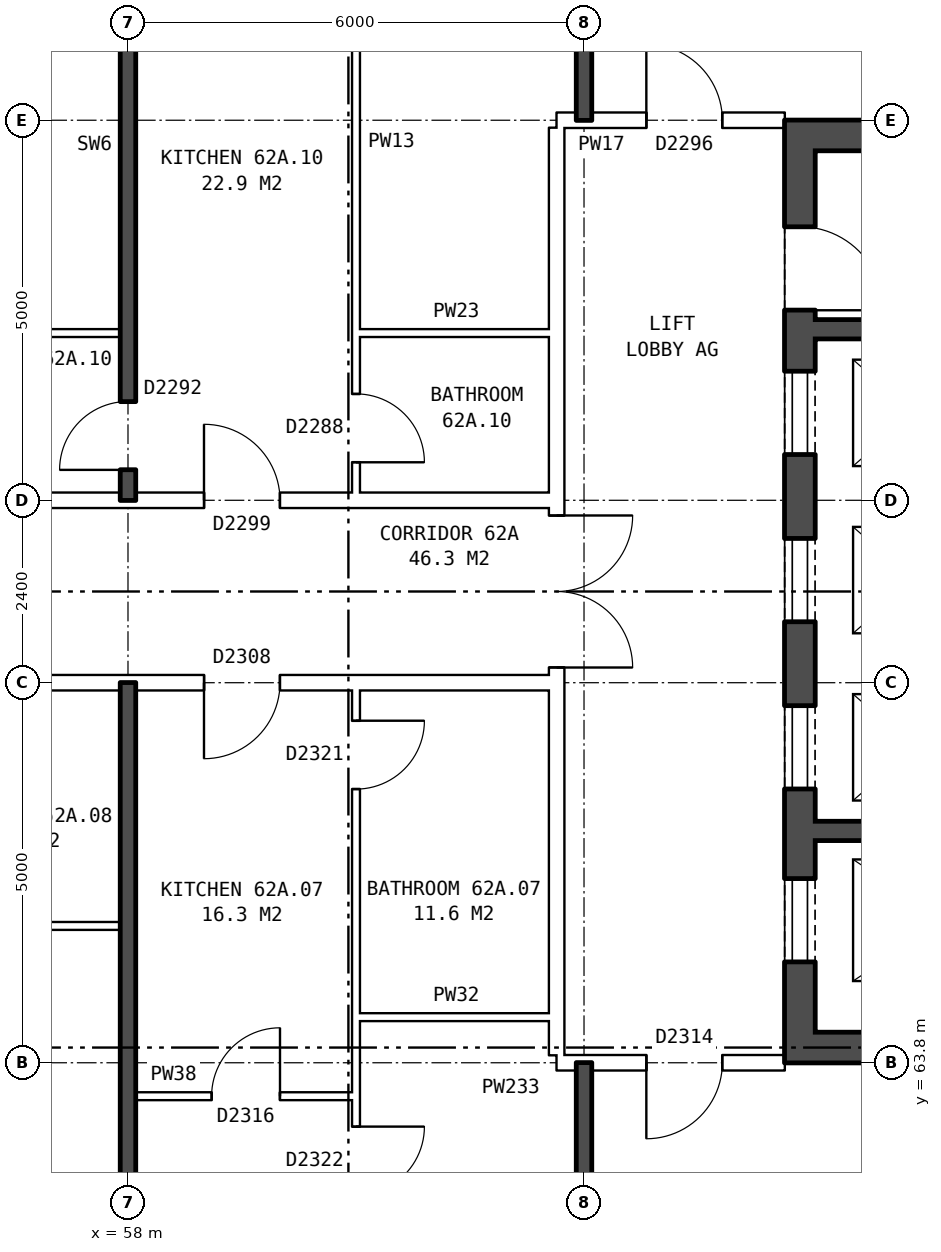
"""IFC4 building model, lengths in metres.
Left out: names, types, materials, properties, quantities, classifications, styles, units other than length and angle.
Written with IfcOpenShell. Run it as: python <this file> out.ifc"""

import sys

from ifc_helpers import new_model, si_unit, direction, frame, frame_2d, origin, place, context, subcontext, project, spatial, rectangle, extrude, element, fill, save


model = new_model("IFC4")
c1 = context("Model", 3, precision=1e-05, world=origin(), true_north=direction((0.0, 1.0)))
c2 = subcontext(c1, "Body", "Model", "MODEL_VIEW")
j1 = project(units=[si_unit("LENGTHUNIT", "METRE"), si_unit("PLANEANGLEUNIT", "RADIAN")], contexts=[c1])
p1 = place(None, origin())
s1 = spatial("IfcSite", under=j1, at=p1, CompositionType="ELEMENT")
p2 = place(p1, origin())
s2 = spatial("IfcBuilding", under=s1, at=p2, CompositionType="ELEMENT")
p3 = place(p2, frame((0.0, 0.0, 221.4)))
s3 = spatial("IfcBuildingStorey", under=s2, at=p3, CompositionType="ELEMENT", Elevation=221.4)
p4 = place(p3, frame((66.84, 63.8, 0.0), z_axis=(0.0, 0.0, 1.0), x_axis=(0.0, 1.0, 0.0)))
e1 = element("IfcWall", 1, at=p4, inside=s3, PredefinedType="SHEAR", context=c2, shape_type="SweptSolid", body=[
    extrude(rectangle(XDim=12.4, YDim=0.4, at=frame_2d((6.2, 0.0))), origin(), (0.0, 0.0, 1.0), 2.85),
])
p5 = place(p4, frame((1.325, 0.0, 0.0)))
e2 = element("IfcOpeningElement", 2, at=p5, cuts=e1, PredefinedType="OPENING", context=c2, shape_type="SweptSolid", body=[
    extrude(rectangle(XDim=1.1, YDim=2.1, at=frame_2d((0.55, 1.05))), frame((0.0, 0.21, 0.0), z_axis=(0.0, -1.0, 0.0), x_axis=(1.0, 0.0, 0.0)), (0.0, 0.0, 1.0), 0.42),
])
p6 = place(p4, frame((3.6, 0.0, 0.0)))
e3 = element("IfcOpeningElement", 3, at=p6, cuts=e1, PredefinedType="OPENING", context=c2, shape_type="SweptSolid", body=[
    extrude(rectangle(XDim=1.1, YDim=2.1, at=frame_2d((0.55, 1.05))), frame((0.0, 0.21, 0.0), z_axis=(0.0, -1.0, 0.0), x_axis=(1.0, 0.0, 0.0)), (0.0, 0.0, 1.0), 0.42),
])
p7 = place(p4, frame((5.8, 0.0, 0.0)))
e4 = element("IfcOpeningElement", 4, at=p7, cuts=e1, PredefinedType="OPENING", context=c2, shape_type="SweptSolid", body=[
    extrude(rectangle(XDim=1.1, YDim=2.1, at=frame_2d((0.55, 1.05))), frame((0.0, 0.21, 0.0), z_axis=(0.0, -1.0, 0.0), x_axis=(1.0, 0.0, 0.0)), (0.0, 0.0, 1.0), 0.42),
])
p8 = place(p4, frame((8.0, 0.0, 0.0)))
e5 = element("IfcOpeningElement", 5, at=p8, cuts=e1, PredefinedType="OPENING", context=c2, shape_type="SweptSolid", body=[
    extrude(rectangle(XDim=1.1, YDim=2.1, at=frame_2d((0.55, 1.05))), frame((0.0, 0.21, 0.0), z_axis=(0.0, -1.0, 0.0), x_axis=(1.0, 0.0, 0.0)), (0.0, 0.0, 1.0), 0.42),
])
p9 = place(p4, frame((9.9, 0.0, 0.0)))
e6 = element("IfcOpeningElement", 6, at=p9, cuts=e1, PredefinedType="OPENING", context=c2, shape_type="SweptSolid", body=[
    extrude(rectangle(XDim=1.1, YDim=2.1, at=frame_2d((0.55, 1.05))), frame((0.0, 0.21, 0.0), z_axis=(0.0, -1.0, 0.0), x_axis=(1.0, 0.0, 0.0)), (0.0, 0.0, 1.0), 0.42),
])
for number, where, z_axis, x_axis in (
    (7, (67.04, 64.0, 0.0), (0.0, 0.0, 1.0), (1.0, 0.0, 0.0)),
    (8, (67.04, 76.0, 0.0), (0.0, 0.0, 1.0), (1.0, 0.0, 0.0)),
):
    element("IfcWall", number, at=place(p3, frame(where, z_axis=z_axis, x_axis=x_axis)), inside=s3, PredefinedType="SHEAR", context=c2, shape_type="SweptSolid", body=[
        extrude(rectangle(XDim=8.2, YDim=0.4, at=frame_2d((4.1, 0.0))), origin(), (0.0, 0.0, 1.0), 2.85),
    ])
p10 = place(p3, frame((67.04, 66.85, 0.0), z_axis=(0.0, 0.0, 1.0), x_axis=(1.0, 0.0, 0.0)))
e9 = element("IfcWall", 9, at=p10, inside=s3, PredefinedType="SHEAR", context=c2, shape_type="SweptSolid", body=[
    extrude(rectangle(XDim=3.595, YDim=0.25, at=frame_2d((1.797, 0.0))), origin(), (0.0, 0.0, 1.0), 2.85),
])
p11 = place(p3, frame((67.04, 73.45, 0.0), z_axis=(0.0, 0.0, 1.0), x_axis=(1.0, 0.0, 0.0)))
e10 = element("IfcWall", 10, at=p11, inside=s3, PredefinedType="SHEAR", context=c2, shape_type="SweptSolid", body=[
    extrude(rectangle(XDim=2.525, YDim=0.25, at=frame_2d((1.262, 0.0))), origin(), (0.0, 0.0, 1.0), 2.85),
])
p12 = place(p3, frame((63.64, 63.9, 0.0), z_axis=(0.0, 0.0, 1.0), x_axis=(0.0, 1.0, 0.0)))
e11 = element("IfcWall", 11, at=p12, inside=s3, PredefinedType="PARTITIONING", context=c2, shape_type="SweptSolid", body=[
    extrude(rectangle(XDim=12.2, YDim=0.2, at=frame_2d((6.1, 0.0))), origin(), (0.0, 0.0, 1.0), 2.85),
])
p13 = place(p12, frame((5.1, 0.0, 0.0)))
e12 = element("IfcOpeningElement", 12, at=p13, cuts=e11, PredefinedType="OPENING", context=c2, shape_type="SweptSolid", body=[
    extrude(rectangle(XDim=2.0, YDim=2.1, at=frame_2d((1.0, 1.05))), frame((0.0, 0.11, 0.0), z_axis=(0.0, -1.0, 0.0), x_axis=(1.0, 0.0, 0.0)), (0.0, 0.0, 1.0), 0.22),
])
p14 = place(p3, frame((58.1, 63.36, 0.0), z_axis=(0.0, 0.0, 1.0), x_axis=(1.0, 0.0, 0.0)))
e13 = element("IfcWall", 13, at=p14, inside=s3, PredefinedType="PARTITIONING", context=c2, shape_type="SweptSolid", body=[
    extrude(rectangle(XDim=2.9, YDim=0.1, at=frame_2d((1.45, 0.0))), origin(), (0.0, 0.0, 1.0), 2.85),
])
p15 = place(p14, frame((1.0, 0.0, 0.0)))
e14 = element("IfcOpeningElement", 14, at=p15, cuts=e13, PredefinedType="OPENING", context=c2, shape_type="SweptSolid", body=[
    extrude(rectangle(XDim=0.9, YDim=2.1, at=frame_2d((0.45, 1.05))), frame((0.0, 0.06, 0.0), z_axis=(0.0, -1.0, 0.0), x_axis=(1.0, 0.0, 0.0)), (0.0, 0.0, 1.0), 0.12),
])
p16 = place(p3, frame((63.64, 63.8, 0.0), z_axis=(0.0, 0.0, 1.0), x_axis=(1.0, 0.0, 0.0)))
e15 = element("IfcWall", 15, at=p16, inside=s3, PredefinedType="PARTITIONING", context=c2, shape_type="SweptSolid", body=[
    extrude(rectangle(XDim=3.0, YDim=0.2, at=frame_2d((1.5, 0.0))), origin(), (0.0, 0.0, 1.0), 2.85),
])
p17 = place(p16, frame((1.18, 0.0, 0.0)))
e16 = element("IfcOpeningElement", 16, at=p17, cuts=e15, PredefinedType="OPENING", context=c2, shape_type="SweptSolid", body=[
    extrude(rectangle(XDim=1.0, YDim=2.1, at=frame_2d((0.5, 1.05))), frame((0.0, 0.11, 0.0), z_axis=(0.0, -1.0, 0.0), x_axis=(1.0, 0.0, 0.0)), (0.0, 0.0, 1.0), 0.22),
])
p18 = place(p3, frame((61.0, 64.4, 0.0), z_axis=(0.0, 0.0, 1.0), x_axis=(1.0, 0.0, 0.0)))
e17 = element("IfcWall", 17, at=p18, inside=s3, PredefinedType="PARTITIONING", context=c2, shape_type="SweptSolid", body=[
    extrude(rectangle(XDim=2.64, YDim=0.1, at=frame_2d((1.32, 0.0))), origin(), (0.0, 0.0, 1.0), 2.85),
])
p19 = place(p3, frame((55.0, 65.6, 0.0), z_axis=(0.0, 0.0, 1.0), x_axis=(1.0, 0.0, 0.0)))
e18 = element("IfcWall", 18, at=p19, inside=s3, PredefinedType="PARTITIONING", context=c2, shape_type="SweptSolid", body=[
    extrude(rectangle(XDim=2.9, YDim=0.1, at=frame_2d((1.45, 0.0))), origin(), (0.0, 0.0, 1.0), 2.85),
])
p20 = place(p3, frame((44.36, 68.8, 0.0), z_axis=(0.0, 0.0, 1.0), x_axis=(1.0, 0.0, 0.0)))
e19 = element("IfcWall", 19, at=p20, inside=s3, PredefinedType="PARTITIONING", context=c2, shape_type="SweptSolid", body=[
    extrude(rectangle(XDim=19.28, YDim=0.2, at=frame_2d((9.64, 0.0))), origin(), (0.0, 0.0, 1.0), 2.85),
])
p21 = place(p20, frame((14.64, 0.0, 0.0)))
e20 = element("IfcOpeningElement", 20, at=p21, cuts=e19, PredefinedType="OPENING", context=c2, shape_type="SweptSolid", body=[
    extrude(rectangle(XDim=1.0, YDim=2.1, at=frame_2d((0.5, 1.05))), frame((0.0, 0.11, 0.0), z_axis=(0.0, -1.0, 0.0), x_axis=(1.0, 0.0, 0.0)), (0.0, 0.0, 1.0), 0.22),
])
p22 = place(p20, frame((8.64, 0.0, 0.0)))
e21 = element("IfcOpeningElement", 21, at=p22, cuts=e19, PredefinedType="OPENING", context=c2, shape_type="SweptSolid", body=[
    extrude(rectangle(XDim=1.0, YDim=2.1, at=frame_2d((0.5, 1.05))), frame((0.0, 0.11, 0.0), z_axis=(0.0, -1.0, 0.0), x_axis=(1.0, 0.0, 0.0)), (0.0, 0.0, 1.0), 0.22),
])
p23 = place(p20, frame((5.64, 0.0, 0.0)))
e22 = element("IfcOpeningElement", 22, at=p23, cuts=e19, PredefinedType="OPENING", context=c2, shape_type="SweptSolid", body=[
    extrude(rectangle(XDim=1.0, YDim=2.1, at=frame_2d((0.5, 1.05))), frame((0.0, 0.11, 0.0), z_axis=(0.0, -1.0, 0.0), x_axis=(1.0, 0.0, 0.0)), (0.0, 0.0, 1.0), 0.22),
])
p24 = place(p3, frame((44.36, 71.2, 0.0), z_axis=(0.0, 0.0, 1.0), x_axis=(1.0, 0.0, 0.0)))
e23 = element("IfcWall", 23, at=p24, inside=s3, PredefinedType="PARTITIONING", context=c2, shape_type="SweptSolid", body=[
    extrude(rectangle(XDim=19.28, YDim=0.2, at=frame_2d((9.64, 0.0))), origin(), (0.0, 0.0, 1.0), 2.85),
])
p25 = place(p24, frame((14.64, 0.0, 0.0)))
e24 = element("IfcOpeningElement", 24, at=p25, cuts=e23, PredefinedType="OPENING", context=c2, shape_type="SweptSolid", body=[
    extrude(rectangle(XDim=1.0, YDim=2.1, at=frame_2d((0.5, 1.05))), frame((0.0, 0.11, 0.0), z_axis=(0.0, -1.0, 0.0), x_axis=(1.0, 0.0, 0.0)), (0.0, 0.0, 1.0), 0.22),
])
p26 = place(p24, frame((5.64, 0.0, 0.0)))
e25 = element("IfcOpeningElement", 25, at=p26, cuts=e23, PredefinedType="OPENING", context=c2, shape_type="SweptSolid", body=[
    extrude(rectangle(XDim=1.0, YDim=2.1, at=frame_2d((0.5, 1.05))), frame((0.0, 0.11, 0.0), z_axis=(0.0, -1.0, 0.0), x_axis=(1.0, 0.0, 0.0)), (0.0, 0.0, 1.0), 0.22),
])
p27 = place(p3, frame((55.1, 73.4, 0.0), z_axis=(0.0, 0.0, 1.0), x_axis=(1.0, 0.0, 0.0)))
e26 = element("IfcWall", 26, at=p27, inside=s3, PredefinedType="PARTITIONING", context=c2, shape_type="SweptSolid", body=[
    extrude(rectangle(XDim=2.8, YDim=0.1, at=frame_2d((1.4, 0.0))), origin(), (0.0, 0.0, 1.0), 2.85),
])
p28 = place(p3, frame((61.0, 73.4, 0.0), z_axis=(0.0, 0.0, 1.0), x_axis=(1.0, 0.0, 0.0)))
e27 = element("IfcWall", 27, at=p28, inside=s3, PredefinedType="PARTITIONING", context=c2, shape_type="SweptSolid", body=[
    extrude(rectangle(XDim=2.64, YDim=0.1, at=frame_2d((1.32, 0.0))), origin(), (0.0, 0.0, 1.0), 2.85),
])
p29 = place(p3, frame((63.64, 76.2, 0.0), z_axis=(0.0, 0.0, 1.0), x_axis=(1.0, 0.0, 0.0)))
e28 = element("IfcWall", 28, at=p29, inside=s3, PredefinedType="PARTITIONING", context=c2, shape_type="SweptSolid", body=[
    extrude(rectangle(XDim=3.0, YDim=0.2, at=frame_2d((1.5, 0.0))), origin(), (0.0, 0.0, 1.0), 2.85),
])
p30 = place(p29, frame((1.18, 0.0, 0.0)))
e29 = element("IfcOpeningElement", 29, at=p30, cuts=e28, PredefinedType="OPENING", context=c2, shape_type="SweptSolid", body=[
    extrude(rectangle(XDim=1.0, YDim=2.1, at=frame_2d((0.5, 1.05))), frame((0.0, 0.11, 0.0), z_axis=(0.0, -1.0, 0.0), x_axis=(1.0, 0.0, 0.0)), (0.0, 0.0, 1.0), 0.22),
])
p31 = place(p3, frame((58.0, 54.36, 0.0), z_axis=(0.0, 0.0, 1.0), x_axis=(0.0, 1.0, 0.0)))
e30 = element("IfcWall", 30, at=p31, inside=s3, PredefinedType="SOLIDWALL", context=c2, shape_type="SweptSolid", body=[
    extrude(rectangle(XDim=14.44, YDim=0.2, at=frame_2d((7.22, 0.0))), origin(), (0.0, 0.0, 1.0), 2.85),
])
p32 = place(p3, frame((58.0, 71.2, 0.0), z_axis=(0.0, 0.0, 1.0), x_axis=(0.0, 1.0, 0.0)))
e31 = element("IfcWall", 31, at=p32, inside=s3, PredefinedType="SOLIDWALL", context=c2, shape_type="SweptSolid", body=[
    extrude(rectangle(XDim=14.44, YDim=0.2, at=frame_2d((7.22, 0.0))), origin(), (0.0, 0.0, 1.0), 2.85),
])
p33 = place(p32, frame((8.04, 0.0, 0.0)))
e32 = element("IfcOpeningElement", 32, at=p33, cuts=e31, PredefinedType="OPENING", context=c2, shape_type="SweptSolid", body=[
    extrude(rectangle(XDim=0.9, YDim=2.1, at=frame_2d((0.45, 1.05))), frame((0.0, 0.11, 0.0), z_axis=(0.0, -1.0, 0.0), x_axis=(1.0, 0.0, 0.0)), (0.0, 0.0, 1.0), 0.22),
])
p34 = place(p32, frame((0.4, 0.0, 0.0)))
e33 = element("IfcOpeningElement", 33, at=p34, cuts=e31, PredefinedType="OPENING", context=c2, shape_type="SweptSolid", body=[
    extrude(rectangle(XDim=0.9, YDim=2.1, at=frame_2d((0.45, 1.05))), frame((0.0, 0.11, 0.0), z_axis=(0.0, -1.0, 0.0), x_axis=(1.0, 0.0, 0.0)), (0.0, 0.0, 1.0), 0.22),
])
p35 = place(p3, frame((61.0, 54.36, 0.0), z_axis=(0.0, 0.0, 1.0), x_axis=(0.0, 1.0, 0.0)))
e34 = element("IfcWall", 34, at=p35, inside=s3, PredefinedType="PARTITIONING", context=c2, shape_type="SweptSolid", body=[
    extrude(rectangle(XDim=14.34, YDim=0.1, at=frame_2d((7.17, 0.0))), origin(), (0.0, 0.0, 1.0), 2.85),
])
p36 = place(p35, frame((7.7, 0.0, 0.0)))
e35 = element("IfcOpeningElement", 35, at=p36, cuts=e34, PredefinedType="OPENING", context=c2, shape_type="SweptSolid", body=[
    extrude(rectangle(XDim=0.9, YDim=2.1, at=frame_2d((0.45, 1.05))), frame((0.0, 0.06, 0.0), z_axis=(0.0, -1.0, 0.0), x_axis=(1.0, 0.0, 0.0)), (0.0, 0.0, 1.0), 0.12),
])
p37 = place(p35, frame((13.04, 0.0, 0.0)))
e36 = element("IfcOpeningElement", 36, at=p37, cuts=e34, PredefinedType="OPENING", context=c2, shape_type="SweptSolid", body=[
    extrude(rectangle(XDim=0.9, YDim=2.1, at=frame_2d((0.45, 1.05))), frame((0.0, 0.06, 0.0), z_axis=(0.0, -1.0, 0.0), x_axis=(1.0, 0.0, 0.0)), (0.0, 0.0, 1.0), 0.12),
])
p38 = place(p3, frame((61.0, 71.3, 0.0), z_axis=(0.0, 0.0, 1.0), x_axis=(0.0, 1.0, 0.0)))
e37 = element("IfcWall", 37, at=p38, inside=s3, PredefinedType="PARTITIONING", context=c2, shape_type="SweptSolid", body=[
    extrude(rectangle(XDim=14.34, YDim=0.1, at=frame_2d((7.17, 0.0))), origin(), (0.0, 0.0, 1.0), 2.85),
])
p39 = place(p38, frame((7.94, 0.0, 0.0)))
e38 = element("IfcOpeningElement", 38, at=p39, cuts=e37, PredefinedType="OPENING", context=c2, shape_type="SweptSolid", body=[
    extrude(rectangle(XDim=0.9, YDim=2.1, at=frame_2d((0.45, 1.05))), frame((0.0, 0.06, 0.0), z_axis=(0.0, -1.0, 0.0), x_axis=(1.0, 0.0, 0.0)), (0.0, 0.0, 1.0), 0.12),
])
p40 = place(p38, frame((0.4, 0.0, 0.0)))
e39 = element("IfcOpeningElement", 39, at=p40, cuts=e37, PredefinedType="OPENING", context=c2, shape_type="SweptSolid", body=[
    extrude(rectangle(XDim=0.9, YDim=2.1, at=frame_2d((0.45, 1.05))), frame((0.0, 0.06, 0.0), z_axis=(0.0, -1.0, 0.0), x_axis=(1.0, 0.0, 0.0)), (0.0, 0.0, 1.0), 0.12),
])
for number, where, z_axis, x_axis in (
    (40, (64.0, 54.36, 0.0), (0.0, 0.0, 1.0), (0.0, 1.0, 0.0)),
    (41, (64.0, 76.2, 0.0), (0.0, 0.0, 1.0), (0.0, 1.0, 0.0)),
):
    element("IfcWall", number, at=place(p3, frame(where, z_axis=z_axis, x_axis=x_axis)), inside=s3, PredefinedType="SOLIDWALL", context=c2, shape_type="SweptSolid", body=[
        extrude(rectangle(XDim=9.44, YDim=0.2, at=frame_2d((4.72, 0.0))), origin(), (0.0, 0.0, 1.0), 2.85),
    ])
p41 = place(p5, origin())
e42 = element("IfcDoor", 42, at=p41, inside=s3, OperationType="DOUBLE_DOOR_SLIDING", PredefinedType="DOOR", context=c2, shape_type="SweptSolid", body=[
    extrude(rectangle(XDim=1.1, YDim=2.1, at=frame_2d((0.55, 1.05))), frame((0.0, -0.135, 0.0), z_axis=(0.0, -1.0, 0.0), x_axis=(1.0, 0.0, 0.0)), (0.0, 0.0, 1.0), 0.05),
])
fill(e2, e42)
p42 = place(p6, origin())
e43 = element("IfcDoor", 43, at=p42, inside=s3, OperationType="DOUBLE_DOOR_SLIDING", PredefinedType="DOOR", context=c2, shape_type="SweptSolid", body=[
    extrude(rectangle(XDim=1.1, YDim=2.1, at=frame_2d((0.55, 1.05))), frame((0.0, -0.135, 0.0), z_axis=(0.0, -1.0, 0.0), x_axis=(1.0, 0.0, 0.0)), (0.0, 0.0, 1.0), 0.05),
])
fill(e3, e43)
p43 = place(p7, origin())
e44 = element("IfcDoor", 44, at=p43, inside=s3, OperationType="DOUBLE_DOOR_SLIDING", PredefinedType="DOOR", context=c2, shape_type="SweptSolid", body=[
    extrude(rectangle(XDim=1.1, YDim=2.1, at=frame_2d((0.55, 1.05))), frame((0.0, -0.135, 0.0), z_axis=(0.0, -1.0, 0.0), x_axis=(1.0, 0.0, 0.0)), (0.0, 0.0, 1.0), 0.05),
])
fill(e4, e44)
p44 = place(p8, origin())
e45 = element("IfcDoor", 45, at=p44, inside=s3, OperationType="DOUBLE_DOOR_SLIDING", PredefinedType="DOOR", context=c2, shape_type="SweptSolid", body=[
    extrude(rectangle(XDim=1.1, YDim=2.1, at=frame_2d((0.55, 1.05))), frame((0.0, -0.135, 0.0), z_axis=(0.0, -1.0, 0.0), x_axis=(1.0, 0.0, 0.0)), (0.0, 0.0, 1.0), 0.05),
])
fill(e5, e45)
p45 = place(p9, frame((1.1, 0.0, 0.0), z_axis=(0.0, 0.0, 1.0), x_axis=(-1.0, 0.0, 0.0)))
e46 = element("IfcDoor", 46, at=p45, inside=s3, OperationType="SINGLE_SWING_RIGHT", PredefinedType="DOOR", context=c2, shape_type="SweptSolid", body=[
    extrude(rectangle(XDim=1.1, YDim=2.1, at=frame_2d((0.55, 1.05))), frame((0.0, 0.185, 0.0), z_axis=(0.0, -1.0, 0.0), x_axis=(1.0, 0.0, 0.0)), (0.0, 0.0, 1.0), 0.05),
])
fill(e6, e46)
p46 = place(p13, frame((2.0, 0.0, 0.0), z_axis=(0.0, 0.0, 1.0), x_axis=(-1.0, 0.0, 0.0)))
e47 = element("IfcDoor", 47, at=p46, inside=s3, OperationType="DOUBLE_DOOR_SINGLE_SWING", PredefinedType="DOOR", context=c2, shape_type="SweptSolid", body=[
    extrude(rectangle(XDim=2.0, YDim=2.1, at=frame_2d((1.0, 1.05))), frame((0.0, 0.025, 0.0), z_axis=(0.0, -1.0, 0.0), x_axis=(1.0, 0.0, 0.0)), (0.0, 0.0, 1.0), 0.05),
])
fill(e12, e47)
p47 = place(p17, frame((1.0, 0.0, 0.0), z_axis=(0.0, 0.0, 1.0), x_axis=(-1.0, 0.0, 0.0)))
e48 = element("IfcDoor", 48, at=p47, inside=s3, OperationType="SINGLE_SWING_RIGHT", PredefinedType="DOOR", context=c2, shape_type="SweptSolid", body=[
    extrude(rectangle(XDim=1.0, YDim=2.1, at=frame_2d((0.5, 1.05))), frame((0.0, 0.025, 0.0), z_axis=(0.0, -1.0, 0.0), x_axis=(1.0, 0.0, 0.0)), (0.0, 0.0, 1.0), 0.05),
])
fill(e16, e48)
p48 = place(p30, origin())
e49 = element("IfcDoor", 49, at=p48, inside=s3, OperationType="SINGLE_SWING_LEFT", PredefinedType="DOOR", context=c2, shape_type="SweptSolid", body=[
    extrude(rectangle(XDim=1.0, YDim=2.1, at=frame_2d((0.5, 1.05))), frame((0.0, 0.025, 0.0), z_axis=(0.0, -1.0, 0.0), x_axis=(1.0, 0.0, 0.0)), (0.0, 0.0, 1.0), 0.05),
])
fill(e29, e49)
p49 = place(p36, frame((0.9, 0.0, 0.0), z_axis=(0.0, 0.0, 1.0), x_axis=(-1.0, 0.0, 0.0)))
e50 = element("IfcDoor", 50, at=p49, inside=s3, OperationType="SINGLE_SWING_LEFT", PredefinedType="DOOR", context=c2, shape_type="SweptSolid", body=[
    extrude(rectangle(XDim=0.9, YDim=2.1, at=frame_2d((0.45, 1.05))), frame((0.0, 0.025, 0.0), z_axis=(0.0, -1.0, 0.0), x_axis=(1.0, 0.0, 0.0)), (0.0, 0.0, 1.0), 0.05),
])
fill(e35, e50)
p50 = place(p21, frame((1.0, 0.0, 0.0), z_axis=(0.0, 0.0, 1.0), x_axis=(-1.0, 0.0, 0.0)))
e51 = element("IfcDoor", 51, at=p50, inside=s3, OperationType="SINGLE_SWING_RIGHT", PredefinedType="DOOR", context=c2, shape_type="SweptSolid", body=[
    extrude(rectangle(XDim=1.0, YDim=2.1, at=frame_2d((0.5, 1.05))), frame((0.0, 0.025, 0.0), z_axis=(0.0, -1.0, 0.0), x_axis=(1.0, 0.0, 0.0)), (0.0, 0.0, 1.0), 0.05),
])
fill(e20, e51)
p51 = place(p15, origin())
e52 = element("IfcDoor", 52, at=p51, inside=s3, OperationType="SINGLE_SWING_RIGHT", PredefinedType="DOOR", context=c2, shape_type="SweptSolid", body=[
    extrude(rectangle(XDim=0.9, YDim=2.1, at=frame_2d((0.45, 1.05))), frame((0.0, 0.025, 0.0), z_axis=(0.0, -1.0, 0.0), x_axis=(1.0, 0.0, 0.0)), (0.0, 0.0, 1.0), 0.05),
])
fill(e14, e52)
p52 = place(p37, frame((0.9, 0.0, 0.0), z_axis=(0.0, 0.0, 1.0), x_axis=(-1.0, 0.0, 0.0)))
e53 = element("IfcDoor", 53, at=p52, inside=s3, OperationType="SINGLE_SWING_LEFT", PredefinedType="DOOR", context=c2, shape_type="SweptSolid", body=[
    extrude(rectangle(XDim=0.9, YDim=2.1, at=frame_2d((0.45, 1.05))), frame((0.0, 0.025, 0.0), z_axis=(0.0, -1.0, 0.0), x_axis=(1.0, 0.0, 0.0)), (0.0, 0.0, 1.0), 0.05),
])
fill(e36, e53)
p53 = place(p25, origin())
e54 = element("IfcDoor", 54, at=p53, inside=s3, OperationType="SINGLE_SWING_LEFT", PredefinedType="DOOR", context=c2, shape_type="SweptSolid", body=[
    extrude(rectangle(XDim=1.0, YDim=2.1, at=frame_2d((0.5, 1.05))), frame((0.0, 0.025, 0.0), z_axis=(0.0, -1.0, 0.0), x_axis=(1.0, 0.0, 0.0)), (0.0, 0.0, 1.0), 0.05),
])
fill(e24, e54)
p54 = place(p40, frame((0.9, 0.0, 0.0), z_axis=(0.0, 0.0, 1.0), x_axis=(-1.0, 0.0, 0.0)))
e55 = element("IfcDoor", 55, at=p54, inside=s3, OperationType="SINGLE_SWING_RIGHT", PredefinedType="DOOR", context=c2, shape_type="SweptSolid", body=[
    extrude(rectangle(XDim=0.9, YDim=2.1, at=frame_2d((0.45, 1.05))), frame((0.0, 0.025, 0.0), z_axis=(0.0, -1.0, 0.0), x_axis=(1.0, 0.0, 0.0)), (0.0, 0.0, 1.0), 0.05),
])
fill(e39, e55)
p55 = place(p34, origin())
e56 = element("IfcDoor", 56, at=p55, inside=s3, OperationType="SINGLE_SWING_LEFT", PredefinedType="DOOR", context=c2, shape_type="SweptSolid", body=[
    extrude(rectangle(XDim=0.9, YDim=2.1, at=frame_2d((0.45, 1.05))), frame((0.0, 0.025, 0.0), z_axis=(0.0, -1.0, 0.0), x_axis=(1.0, 0.0, 0.0)), (0.0, 0.0, 1.0), 0.05),
])
fill(e33, e56)
save(model, sys.argv[1])
